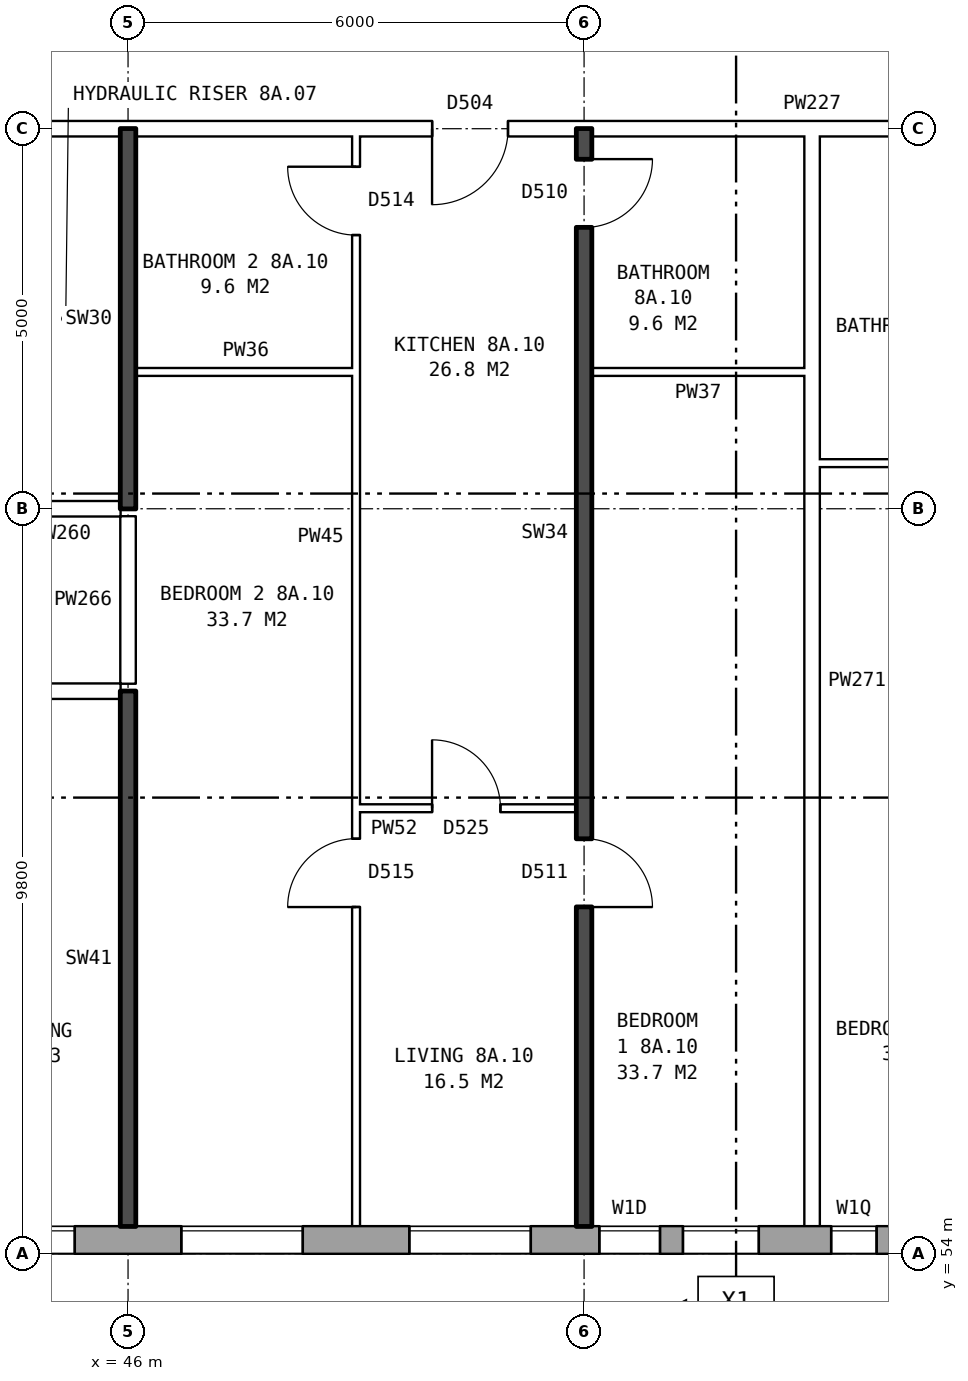
"""IFC4 building model, lengths in metres.
Left out: names, types, materials, properties, quantities, classifications, styles, units other than length and angle.
Written with IfcOpenShell. Run it as: python <this file> out.ifc"""

import sys

from ifc_helpers import new_model, si_unit, direction, frame, frame_2d, origin, place, context, subcontext, project, spatial, rectangle, extrude, element, fill, save


model = new_model("IFC4")
c1 = context("Model", 3, precision=1e-05, world=origin(), true_north=direction((0.0, 1.0)))
c2 = subcontext(c1, "Body", "Model", "MODEL_VIEW")
j1 = project(units=[si_unit("LENGTHUNIT", "METRE"), si_unit("PLANEANGLEUNIT", "RADIAN")], contexts=[c1])
p1 = place(None, origin())
s1 = spatial("IfcSite", under=j1, at=p1, CompositionType="ELEMENT")
p2 = place(p1, origin())
s2 = spatial("IfcBuilding", under=s1, at=p2, CompositionType="ELEMENT")
p3 = place(p2, frame((0.0, 0.0, 31.9)))
s3 = spatial("IfcBuildingStorey", under=s2, at=p3, CompositionType="ELEMENT", Elevation=31.9)
p4 = place(p3, frame((22.825, 54.18, 0.0), z_axis=(0.0, 0.0, 1.0), x_axis=(1.0, 0.0, 0.0)))
e1 = element("IfcWall", 1, at=p4, inside=s3, PredefinedType="STANDARD", context=c2, shape_type="SweptSolid", body=[
    extrude(rectangle(XDim=50.101, YDim=0.36, at=frame_2d((25.05, 0.0))), origin(), (0.0, 0.0, 1.0), 2.85),
])
p5 = place(p4, frame((2.875, 0.0, 0.8)))
e2 = element("IfcOpeningElement", 2, at=p5, cuts=e1, PredefinedType="OPENING", context=c2, shape_type="SweptSolid", body=[
    extrude(rectangle(XDim=1.6, YDim=1.8, at=frame_2d((0.8, 0.9))), frame((0.0, 0.19, 0.0), z_axis=(0.0, -1.0, 0.0), x_axis=(1.0, 0.0, 0.0)), (0.0, 0.0, 1.0), 0.38),
])
p6 = place(p4, frame((5.875, 0.0, 0.8)))
e3 = element("IfcOpeningElement", 3, at=p6, cuts=e1, PredefinedType="OPENING", context=c2, shape_type="SweptSolid", body=[
    extrude(rectangle(XDim=1.6, YDim=1.8, at=frame_2d((0.8, 0.9))), frame((0.0, 0.19, 0.0), z_axis=(0.0, -1.0, 0.0), x_axis=(1.0, 0.0, 0.0)), (0.0, 0.0, 1.0), 0.38),
])
p7 = place(p4, frame((8.875, 0.0, 0.8)))
e4 = element("IfcOpeningElement", 4, at=p7, cuts=e1, PredefinedType="OPENING", context=c2, shape_type="SweptSolid", body=[
    extrude(rectangle(XDim=1.6, YDim=1.8, at=frame_2d((0.8, 0.9))), frame((0.0, 0.19, 0.0), z_axis=(0.0, -1.0, 0.0), x_axis=(1.0, 0.0, 0.0)), (0.0, 0.0, 1.0), 0.38),
])
p8 = place(p4, frame((11.875, 0.0, 0.8)))
e5 = element("IfcOpeningElement", 5, at=p8, cuts=e1, PredefinedType="OPENING", context=c2, shape_type="SweptSolid", body=[
    extrude(rectangle(XDim=1.6, YDim=1.8, at=frame_2d((0.8, 0.9))), frame((0.0, 0.19, 0.0), z_axis=(0.0, -1.0, 0.0), x_axis=(1.0, 0.0, 0.0)), (0.0, 0.0, 1.0), 0.38),
])
p9 = place(p4, frame((14.875, 0.0, 0.8)))
e6 = element("IfcOpeningElement", 6, at=p9, cuts=e1, PredefinedType="OPENING", context=c2, shape_type="SweptSolid", body=[
    extrude(rectangle(XDim=1.6, YDim=1.8, at=frame_2d((0.8, 0.9))), frame((0.0, 0.19, 0.0), z_axis=(0.0, -1.0, 0.0), x_axis=(1.0, 0.0, 0.0)), (0.0, 0.0, 1.0), 0.38),
])
p10 = place(p4, frame((17.375, 0.0, 1.6)))
e7 = element("IfcOpeningElement", 7, at=p10, cuts=e1, PredefinedType="OPENING", context=c2, shape_type="SweptSolid", body=[
    extrude(rectangle(XDim=0.6, YDim=0.9, at=frame_2d((0.3, 0.45))), frame((0.0, 0.19, 0.0), z_axis=(0.0, -1.0, 0.0), x_axis=(1.0, 0.0, 0.0)), (0.0, 0.0, 1.0), 0.38),
])
p11 = place(p4, frame((20.875, 0.0, 0.8)))
e8 = element("IfcOpeningElement", 8, at=p11, cuts=e1, PredefinedType="OPENING", context=c2, shape_type="SweptSolid", body=[
    extrude(rectangle(XDim=1.6, YDim=1.8, at=frame_2d((0.8, 0.9))), frame((0.0, 0.19, 0.0), z_axis=(0.0, -1.0, 0.0), x_axis=(1.0, 0.0, 0.0)), (0.0, 0.0, 1.0), 0.38),
])
p12 = place(p4, frame((23.875, 0.0, 0.8)))
e9 = element("IfcOpeningElement", 9, at=p12, cuts=e1, PredefinedType="OPENING", context=c2, shape_type="SweptSolid", body=[
    extrude(rectangle(XDim=1.6, YDim=1.8, at=frame_2d((0.8, 0.9))), frame((0.0, 0.19, 0.0), z_axis=(0.0, -1.0, 0.0), x_axis=(1.0, 0.0, 0.0)), (0.0, 0.0, 1.0), 0.38),
])
p13 = place(p4, frame((26.875, 0.0, 0.8)))
e10 = element("IfcOpeningElement", 10, at=p13, cuts=e1, PredefinedType="OPENING", context=c2, shape_type="SweptSolid", body=[
    extrude(rectangle(XDim=1.6, YDim=1.8, at=frame_2d((0.8, 0.9))), frame((0.0, 0.19, 0.0), z_axis=(0.0, -1.0, 0.0), x_axis=(1.0, 0.0, 0.0)), (0.0, 0.0, 1.0), 0.38),
])
p14 = place(p4, frame((29.375, 0.0, 0.15)))
e11 = element("IfcOpeningElement", 11, at=p14, cuts=e1, PredefinedType="OPENING", context=c2, shape_type="SweptSolid", body=[
    extrude(rectangle(XDim=0.8, YDim=1.8, at=frame_2d((0.4, 0.9))), frame((0.0, 0.19, 0.0), z_axis=(0.0, -1.0, 0.0), x_axis=(1.0, 0.0, 0.0)), (0.0, 0.0, 1.0), 0.38),
])
p15 = place(p4, frame((32.425, 0.0, 1.4)))
e12 = element("IfcOpeningElement", 12, at=p15, cuts=e1, PredefinedType="OPENING", context=c2, shape_type="SweptSolid", body=[
    extrude(rectangle(XDim=0.6, YDim=1.2, at=frame_2d((0.3, 0.6))), frame((0.0, 0.19, 0.0), z_axis=(0.0, -1.0, 0.0), x_axis=(1.0, 0.0, 0.0)), (0.0, 0.0, 1.0), 0.38),
])
p16 = place(p4, frame((35.875, 0.0, 0.8)))
e13 = element("IfcOpeningElement", 13, at=p16, cuts=e1, PredefinedType="OPENING", context=c2, shape_type="SweptSolid", body=[
    extrude(rectangle(XDim=1.6, YDim=1.8, at=frame_2d((0.8, 0.9))), frame((0.0, 0.19, 0.0), z_axis=(0.0, -1.0, 0.0), x_axis=(1.0, 0.0, 0.0)), (0.0, 0.0, 1.0), 0.38),
])
p17 = place(p4, frame((38.875, 0.0, 0.8)))
e14 = element("IfcOpeningElement", 14, at=p17, cuts=e1, PredefinedType="OPENING", context=c2, shape_type="SweptSolid", body=[
    extrude(rectangle(XDim=1.6, YDim=1.8, at=frame_2d((0.8, 0.9))), frame((0.0, 0.19, 0.0), z_axis=(0.0, -1.0, 0.0), x_axis=(1.0, 0.0, 0.0)), (0.0, 0.0, 1.0), 0.38),
])
p18 = place(p4, frame((41.875, 0.0, 0.8)))
e15 = element("IfcOpeningElement", 15, at=p18, cuts=e1, PredefinedType="OPENING", context=c2, shape_type="SweptSolid", body=[
    extrude(rectangle(XDim=1.6, YDim=1.8, at=frame_2d((0.8, 0.9))), frame((0.0, 0.19, 0.0), z_axis=(0.0, -1.0, 0.0), x_axis=(1.0, 0.0, 0.0)), (0.0, 0.0, 1.0), 0.38),
])
p19 = place(p4, frame((44.875, 0.0, 0.8)))
e16 = element("IfcOpeningElement", 16, at=p19, cuts=e1, PredefinedType="OPENING", context=c2, shape_type="SweptSolid", body=[
    extrude(rectangle(XDim=1.6, YDim=1.8, at=frame_2d((0.8, 0.9))), frame((0.0, 0.19, 0.0), z_axis=(0.0, -1.0, 0.0), x_axis=(1.0, 0.0, 0.0)), (0.0, 0.0, 1.0), 0.38),
])
p20 = place(p4, frame((47.875, 0.0, 0.8)))
e17 = element("IfcOpeningElement", 17, at=p20, cuts=e1, PredefinedType="OPENING", context=c2, shape_type="SweptSolid", body=[
    extrude(rectangle(XDim=1.6, YDim=1.8, at=frame_2d((0.8, 0.9))), frame((0.0, 0.19, 0.0), z_axis=(0.0, -1.0, 0.0), x_axis=(1.0, 0.0, 0.0)), (0.0, 0.0, 1.0), 0.38),
])
p21 = place(p4, frame((19.525, 0.0, 0.8)))
e18 = element("IfcOpeningElement", 18, at=p21, cuts=e1, PredefinedType="OPENING", context=c2, shape_type="SweptSolid", body=[
    extrude(rectangle(XDim=1.0, YDim=0.9, at=frame_2d((0.5, 0.45))), frame((0.0, 0.19, 0.0), z_axis=(0.0, -1.0, 0.0), x_axis=(1.0, 0.0, 0.0)), (0.0, 0.0, 1.0), 0.38),
])
p22 = place(p4, frame((30.475, 0.0, 0.15)))
e19 = element("IfcOpeningElement", 19, at=p22, cuts=e1, PredefinedType="OPENING", context=c2, shape_type="SweptSolid", body=[
    extrude(rectangle(XDim=1.0, YDim=0.9, at=frame_2d((0.5, 0.45))), frame((0.0, 0.19, 0.0), z_axis=(0.0, -1.0, 0.0), x_axis=(1.0, 0.0, 0.0)), (0.0, 0.0, 1.0), 0.38),
])
p23 = place(p4, frame((33.325, 0.0, 0.8)))
e20 = element("IfcOpeningElement", 20, at=p23, cuts=e1, PredefinedType="OPENING", context=c2, shape_type="SweptSolid", body=[
    extrude(rectangle(XDim=1.6, YDim=1.8, at=frame_2d((0.8, 0.9))), frame((0.0, 0.19, 0.0), z_axis=(0.0, -1.0, 0.0), x_axis=(1.0, 0.0, 0.0)), (0.0, 0.0, 1.0), 0.38),
])
p24 = place(p3, frame((49.0, 59.86, 0.0), z_axis=(0.0, 0.0, 1.0), x_axis=(1.0, 0.0, 0.0)))
e21 = element("IfcWall", 21, at=p24, inside=s3, PredefinedType="PARTITIONING", context=c2, shape_type="SweptSolid", body=[
    extrude(rectangle(XDim=2.9, YDim=0.1, at=frame_2d((1.45, 0.0))), origin(), (0.0, 0.0, 1.0), 2.85),
])
p25 = place(p24, frame((1.0, 0.0, 0.0)))
e22 = element("IfcOpeningElement", 22, at=p25, cuts=e21, PredefinedType="OPENING", context=c2, shape_type="SweptSolid", body=[
    extrude(rectangle(XDim=0.9, YDim=2.1, at=frame_2d((0.45, 1.05))), frame((0.0, 0.06, 0.0), z_axis=(0.0, -1.0, 0.0), x_axis=(1.0, 0.0, 0.0)), (0.0, 0.0, 1.0), 0.12),
])
p26 = place(p3, frame((20.11, 61.4, 0.0), z_axis=(0.0, 0.0, 1.0), x_axis=(1.0, 0.0, 0.0)))
e23 = element("IfcWall", 23, at=p26, inside=s3, PredefinedType="PARTITIONING", context=c2, shape_type="SweptSolid", body=[
    extrude(rectangle(XDim=25.79, YDim=0.2, at=frame_2d((12.895, 0.0))), origin(), (0.0, 0.0, 1.0), 2.85),
])
p27 = place(p26, frame((23.34, 0.0, 0.0)))
e24 = element("IfcOpeningElement", 24, at=p27, cuts=e23, PredefinedType="OPENING", context=c2, shape_type="SweptSolid", body=[
    extrude(rectangle(XDim=1.0, YDim=2.1, at=frame_2d((0.5, 1.05))), frame((0.0, 0.11, 0.0), z_axis=(0.0, -1.0, 0.0), x_axis=(1.0, 0.0, 0.0)), (0.0, 0.0, 1.0), 0.22),
])
p28 = place(p26, frame((17.39, 0.0, 0.0)))
e25 = element("IfcOpeningElement", 25, at=p28, cuts=e23, PredefinedType="OPENING", context=c2, shape_type="SweptSolid", body=[
    extrude(rectangle(XDim=1.0, YDim=2.1, at=frame_2d((0.5, 1.05))), frame((0.0, 0.11, 0.0), z_axis=(0.0, -1.0, 0.0), x_axis=(1.0, 0.0, 0.0)), (0.0, 0.0, 1.0), 0.22),
])
p29 = place(p26, frame((11.39, 0.0, 0.0)))
e26 = element("IfcOpeningElement", 26, at=p29, cuts=e23, PredefinedType="OPENING", context=c2, shape_type="SweptSolid", body=[
    extrude(rectangle(XDim=1.0, YDim=2.1, at=frame_2d((0.5, 1.05))), frame((0.0, 0.11, 0.0), z_axis=(0.0, -1.0, 0.0), x_axis=(1.0, 0.0, 0.0)), (0.0, 0.0, 1.0), 0.22),
])
p30 = place(p26, frame((2.245, 0.0, 0.0)))
e27 = element("IfcOpeningElement", 27, at=p30, cuts=e23, PredefinedType="OPENING", context=c2, shape_type="SweptSolid", body=[
    extrude(rectangle(XDim=1.0, YDim=2.1, at=frame_2d((0.5, 1.05))), frame((0.0, 0.11, 0.0), z_axis=(0.0, -1.0, 0.0), x_axis=(1.0, 0.0, 0.0)), (0.0, 0.0, 1.0), 0.22),
])
p31 = place(p3, frame((44.36, 63.8, 0.0), z_axis=(0.0, 0.0, 1.0), x_axis=(1.0, 0.0, 0.0)))
e28 = element("IfcWall", 28, at=p31, inside=s3, PredefinedType="PARTITIONING", context=c2, shape_type="SweptSolid", body=[
    extrude(rectangle(XDim=1.54, YDim=0.2, at=frame_2d((0.77, 0.0))), origin(), (0.0, 0.0, 1.0), 2.85),
])
p32 = place(p3, frame((55.1, 64.4, 0.0), z_axis=(0.0, 0.0, 1.0), x_axis=(1.0, 0.0, 0.0)))
e29 = element("IfcWall", 29, at=p32, inside=s3, PredefinedType="PARTITIONING", context=c2, shape_type="SweptSolid", body=[
    extrude(rectangle(XDim=2.8, YDim=0.1, at=frame_2d((1.4, 0.0))), origin(), (0.0, 0.0, 1.0), 2.85),
])
p33 = place(p3, frame((46.1, 65.6, 0.0), z_axis=(0.0, 0.0, 1.0), x_axis=(1.0, 0.0, 0.0)))
e30 = element("IfcWall", 30, at=p33, inside=s3, PredefinedType="PARTITIONING", context=c2, shape_type="SweptSolid", body=[
    extrude(rectangle(XDim=2.9, YDim=0.1, at=frame_2d((1.45, 0.0))), origin(), (0.0, 0.0, 1.0), 2.85),
])
p34 = place(p3, frame((52.1, 65.6, 0.0), z_axis=(0.0, 0.0, 1.0), x_axis=(1.0, 0.0, 0.0)))
e31 = element("IfcWall", 31, at=p34, inside=s3, PredefinedType="PARTITIONING", context=c2, shape_type="SweptSolid", body=[
    extrude(rectangle(XDim=2.8, YDim=0.1, at=frame_2d((1.4, 0.0))), origin(), (0.0, 0.0, 1.0), 2.85),
])
p35 = place(p3, frame((44.36, 68.8, 0.0), z_axis=(0.0, 0.0, 1.0), x_axis=(1.0, 0.0, 0.0)))
e32 = element("IfcWall", 32, at=p35, inside=s3, PredefinedType="PARTITIONING", context=c2, shape_type="SweptSolid", body=[
    extrude(rectangle(XDim=19.28, YDim=0.2, at=frame_2d((9.64, 0.0))), origin(), (0.0, 0.0, 1.0), 2.85),
])
p36 = place(p35, frame((14.64, 0.0, 0.0)))
e33 = element("IfcOpeningElement", 33, at=p36, cuts=e32, PredefinedType="OPENING", context=c2, shape_type="SweptSolid", body=[
    extrude(rectangle(XDim=1.0, YDim=2.1, at=frame_2d((0.5, 1.05))), frame((0.0, 0.11, 0.0), z_axis=(0.0, -1.0, 0.0), x_axis=(1.0, 0.0, 0.0)), (0.0, 0.0, 1.0), 0.22),
])
p37 = place(p35, frame((5.64, 0.0, 0.0)))
e34 = element("IfcOpeningElement", 34, at=p37, cuts=e32, PredefinedType="OPENING", context=c2, shape_type="SweptSolid", body=[
    extrude(rectangle(XDim=1.0, YDim=2.1, at=frame_2d((0.5, 1.05))), frame((0.0, 0.11, 0.0), z_axis=(0.0, -1.0, 0.0), x_axis=(1.0, 0.0, 0.0)), (0.0, 0.0, 1.0), 0.22),
])
p38 = place(p3, frame((46.0, 54.36, 0.0), z_axis=(0.0, 0.0, 1.0), x_axis=(0.0, 1.0, 0.0)))
e35 = element("IfcWall", 35, at=p38, inside=s3, PredefinedType="SOLIDWALL", context=c2, shape_type="SweptSolid", body=[
    extrude(rectangle(XDim=7.04, YDim=0.2, at=frame_2d((3.52, 0.0))), origin(), (0.0, 0.0, 1.0), 2.85),
])
p39 = place(p3, frame((46.0, 61.5, 0.0), z_axis=(0.0, 0.0, 1.0), x_axis=(0.0, 1.0, 0.0)))
e36 = element("IfcWall", 36, at=p39, inside=s3, PredefinedType="PARTITIONING", context=c2, shape_type="SweptSolid", body=[
    extrude(rectangle(XDim=2.2, YDim=0.2, at=frame_2d((1.1, 0.0))), origin(), (0.0, 0.0, 1.0), 2.85),
])
p40 = place(p3, frame((46.0, 63.8, 0.0), z_axis=(0.0, 0.0, 1.0), x_axis=(0.0, 1.0, 0.0)))
e37 = element("IfcWall", 37, at=p40, inside=s3, PredefinedType="SOLIDWALL", context=c2, shape_type="SweptSolid", body=[
    extrude(rectangle(XDim=5.0, YDim=0.2, at=frame_2d((2.5, 0.0))), origin(), (0.0, 0.0, 1.0), 2.85),
])
p41 = place(p3, frame((49.0, 54.36, 0.0), z_axis=(0.0, 0.0, 1.0), x_axis=(0.0, 1.0, 0.0)))
e38 = element("IfcWall", 38, at=p41, inside=s3, PredefinedType="PARTITIONING", context=c2, shape_type="SweptSolid", body=[
    extrude(rectangle(XDim=14.34, YDim=0.1, at=frame_2d((7.17, 0.0))), origin(), (0.0, 0.0, 1.0), 2.85),
])
p42 = place(p41, frame((4.2, 0.0, 0.0)))
e39 = element("IfcOpeningElement", 39, at=p42, cuts=e38, PredefinedType="OPENING", context=c2, shape_type="SweptSolid", body=[
    extrude(rectangle(XDim=0.9, YDim=2.1, at=frame_2d((0.45, 1.05))), frame((0.0, 0.06, 0.0), z_axis=(0.0, -1.0, 0.0), x_axis=(1.0, 0.0, 0.0)), (0.0, 0.0, 1.0), 0.12),
])
p43 = place(p41, frame((13.04, 0.0, 0.0)))
e40 = element("IfcOpeningElement", 40, at=p43, cuts=e38, PredefinedType="OPENING", context=c2, shape_type="SweptSolid", body=[
    extrude(rectangle(XDim=0.9, YDim=2.1, at=frame_2d((0.45, 1.05))), frame((0.0, 0.06, 0.0), z_axis=(0.0, -1.0, 0.0), x_axis=(1.0, 0.0, 0.0)), (0.0, 0.0, 1.0), 0.12),
])
p44 = place(p3, frame((52.0, 54.36, 0.0), z_axis=(0.0, 0.0, 1.0), x_axis=(0.0, 1.0, 0.0)))
e41 = element("IfcWall", 41, at=p44, inside=s3, PredefinedType="SOLIDWALL", context=c2, shape_type="SweptSolid", body=[
    extrude(rectangle(XDim=14.44, YDim=0.2, at=frame_2d((7.22, 0.0))), origin(), (0.0, 0.0, 1.0), 2.85),
])
p45 = place(p44, frame((4.2, 0.0, 0.0)))
e42 = element("IfcOpeningElement", 42, at=p45, cuts=e41, PredefinedType="OPENING", context=c2, shape_type="SweptSolid", body=[
    extrude(rectangle(XDim=0.9, YDim=2.1, at=frame_2d((0.45, 1.05))), frame((0.0, 0.11, 0.0), z_axis=(0.0, -1.0, 0.0), x_axis=(1.0, 0.0, 0.0)), (0.0, 0.0, 1.0), 0.22),
])
p46 = place(p44, frame((13.14, 0.0, 0.0)))
e43 = element("IfcOpeningElement", 43, at=p46, cuts=e41, PredefinedType="OPENING", context=c2, shape_type="SweptSolid", body=[
    extrude(rectangle(XDim=0.9, YDim=2.1, at=frame_2d((0.45, 1.05))), frame((0.0, 0.11, 0.0), z_axis=(0.0, -1.0, 0.0), x_axis=(1.0, 0.0, 0.0)), (0.0, 0.0, 1.0), 0.22),
])
p47 = place(p3, frame((55.0, 54.36, 0.0), z_axis=(0.0, 0.0, 1.0), x_axis=(0.0, 1.0, 0.0)))
e44 = element("IfcWall", 44, at=p47, inside=s3, PredefinedType="PARTITIONING", context=c2, shape_type="SweptSolid", body=[
    extrude(rectangle(XDim=14.34, YDim=0.2, at=frame_2d((7.17, 0.0))), origin(), (0.0, 0.0, 1.0), 2.85),
])
p48 = place(p11, origin())
e45 = element("IfcWindow", 45, at=p48, inside=s3, PartitioningType="SINGLE_PANEL", PredefinedType="WINDOW", context=c2, shape_type="SweptSolid", body=[
    extrude(rectangle(XDim=1.6, YDim=1.8, at=frame_2d((0.8, 0.9))), frame((0.0, 0.15, 0.0), z_axis=(0.0, -1.0, 0.0), x_axis=(1.0, 0.0, 0.0)), (0.0, 0.0, 1.0), 0.06),
])
fill(e8, e45)
p49 = place(p12, origin())
e46 = element("IfcWindow", 46, at=p49, inside=s3, PartitioningType="SINGLE_PANEL", PredefinedType="WINDOW", context=c2, shape_type="SweptSolid", body=[
    extrude(rectangle(XDim=1.6, YDim=1.8, at=frame_2d((0.8, 0.9))), frame((0.0, 0.15, 0.0), z_axis=(0.0, -1.0, 0.0), x_axis=(1.0, 0.0, 0.0)), (0.0, 0.0, 1.0), 0.06),
])
fill(e9, e46)
p50 = place(p13, origin())
e47 = element("IfcWindow", 47, at=p50, inside=s3, PartitioningType="SINGLE_PANEL", PredefinedType="WINDOW", context=c2, shape_type="SweptSolid", body=[
    extrude(rectangle(XDim=1.6, YDim=1.8, at=frame_2d((0.8, 0.9))), frame((0.0, 0.15, 0.0), z_axis=(0.0, -1.0, 0.0), x_axis=(1.0, 0.0, 0.0)), (0.0, 0.0, 1.0), 0.06),
])
fill(e10, e47)
p51 = place(p14, origin())
e48 = element("IfcWindow", 48, at=p51, inside=s3, PartitioningType="SINGLE_PANEL", PredefinedType="WINDOW", context=c2, shape_type="SweptSolid", body=[
    extrude(rectangle(XDim=0.8, YDim=1.8, at=frame_2d((0.4, 0.9))), frame((0.0, 0.15, 0.0), z_axis=(0.0, -1.0, 0.0), x_axis=(1.0, 0.0, 0.0)), (0.0, 0.0, 1.0), 0.06),
])
fill(e11, e48)
p52 = place(p15, origin())
e49 = element("IfcWindow", 49, at=p52, inside=s3, PartitioningType="SINGLE_PANEL", PredefinedType="WINDOW", context=c2, shape_type="SweptSolid", body=[
    extrude(rectangle(XDim=0.6, YDim=1.2, at=frame_2d((0.3, 0.6))), frame((0.0, 0.15, 0.0), z_axis=(0.0, -1.0, 0.0), x_axis=(1.0, 0.0, 0.0)), (0.0, 0.0, 1.0), 0.06),
])
fill(e12, e49)
p53 = place(p45, frame((0.9, 0.0, 0.0), z_axis=(0.0, 0.0, 1.0), x_axis=(-1.0, 0.0, 0.0)))
e50 = element("IfcDoor", 50, at=p53, inside=s3, OperationType="SINGLE_SWING_RIGHT", PredefinedType="DOOR", context=c2, shape_type="SweptSolid", body=[
    extrude(rectangle(XDim=0.9, YDim=2.1, at=frame_2d((0.45, 1.05))), frame((0.0, 0.025, 0.0), z_axis=(0.0, -1.0, 0.0), x_axis=(1.0, 0.0, 0.0)), (0.0, 0.0, 1.0), 0.05),
])
fill(e42, e50)
p54 = place(p42, origin())
e51 = element("IfcDoor", 51, at=p54, inside=s3, OperationType="SINGLE_SWING_LEFT", PredefinedType="DOOR", context=c2, shape_type="SweptSolid", body=[
    extrude(rectangle(XDim=0.9, YDim=2.1, at=frame_2d((0.45, 1.05))), frame((0.0, 0.025, 0.0), z_axis=(0.0, -1.0, 0.0), x_axis=(1.0, 0.0, 0.0)), (0.0, 0.0, 1.0), 0.05),
])
fill(e39, e51)
p55 = place(p37, frame((1.0, 0.0, 0.0), z_axis=(0.0, 0.0, 1.0), x_axis=(-1.0, 0.0, 0.0)))
e52 = element("IfcDoor", 52, at=p55, inside=s3, OperationType="SINGLE_SWING_RIGHT", PredefinedType="DOOR", context=c2, shape_type="SweptSolid", body=[
    extrude(rectangle(XDim=1.0, YDim=2.1, at=frame_2d((0.5, 1.05))), frame((0.0, 0.025, 0.0), z_axis=(0.0, -1.0, 0.0), x_axis=(1.0, 0.0, 0.0)), (0.0, 0.0, 1.0), 0.05),
])
fill(e34, e52)
p56 = place(p25, origin())
e53 = element("IfcDoor", 53, at=p56, inside=s3, OperationType="SINGLE_SWING_LEFT", PredefinedType="DOOR", context=c2, shape_type="SweptSolid", body=[
    extrude(rectangle(XDim=0.9, YDim=2.1, at=frame_2d((0.45, 1.05))), frame((0.0, 0.025, 0.0), z_axis=(0.0, -1.0, 0.0), x_axis=(1.0, 0.0, 0.0)), (0.0, 0.0, 1.0), 0.05),
])
fill(e22, e53)
p57 = place(p46, frame((0.9, 0.0, 0.0), z_axis=(0.0, 0.0, 1.0), x_axis=(-1.0, 0.0, 0.0)))
e54 = element("IfcDoor", 54, at=p57, inside=s3, OperationType="SINGLE_SWING_LEFT", PredefinedType="DOOR", context=c2, shape_type="SweptSolid", body=[
    extrude(rectangle(XDim=0.9, YDim=2.1, at=frame_2d((0.45, 1.05))), frame((0.0, 0.025, 0.0), z_axis=(0.0, -1.0, 0.0), x_axis=(1.0, 0.0, 0.0)), (0.0, 0.0, 1.0), 0.05),
])
fill(e43, e54)
p58 = place(p43, origin())
e55 = element("IfcDoor", 55, at=p58, inside=s3, OperationType="SINGLE_SWING_RIGHT", PredefinedType="DOOR", context=c2, shape_type="SweptSolid", body=[
    extrude(rectangle(XDim=0.9, YDim=2.1, at=frame_2d((0.45, 1.05))), frame((0.0, 0.025, 0.0), z_axis=(0.0, -1.0, 0.0), x_axis=(1.0, 0.0, 0.0)), (0.0, 0.0, 1.0), 0.05),
])
fill(e40, e55)
p59 = place(p22, origin())
e56 = element("IfcWindow", 56, at=p59, inside=s3, PartitioningType="SINGLE_PANEL", PredefinedType="WINDOW", context=c2, shape_type="SweptSolid", body=[
    extrude(rectangle(XDim=1.0, YDim=0.9, at=frame_2d((0.5, 0.45))), frame((0.0, 0.15, 0.0), z_axis=(0.0, -1.0, 0.0), x_axis=(1.0, 0.0, 0.0)), (0.0, 0.0, 1.0), 0.06),
])
fill(e19, e56)
save(model, sys.argv[1])
